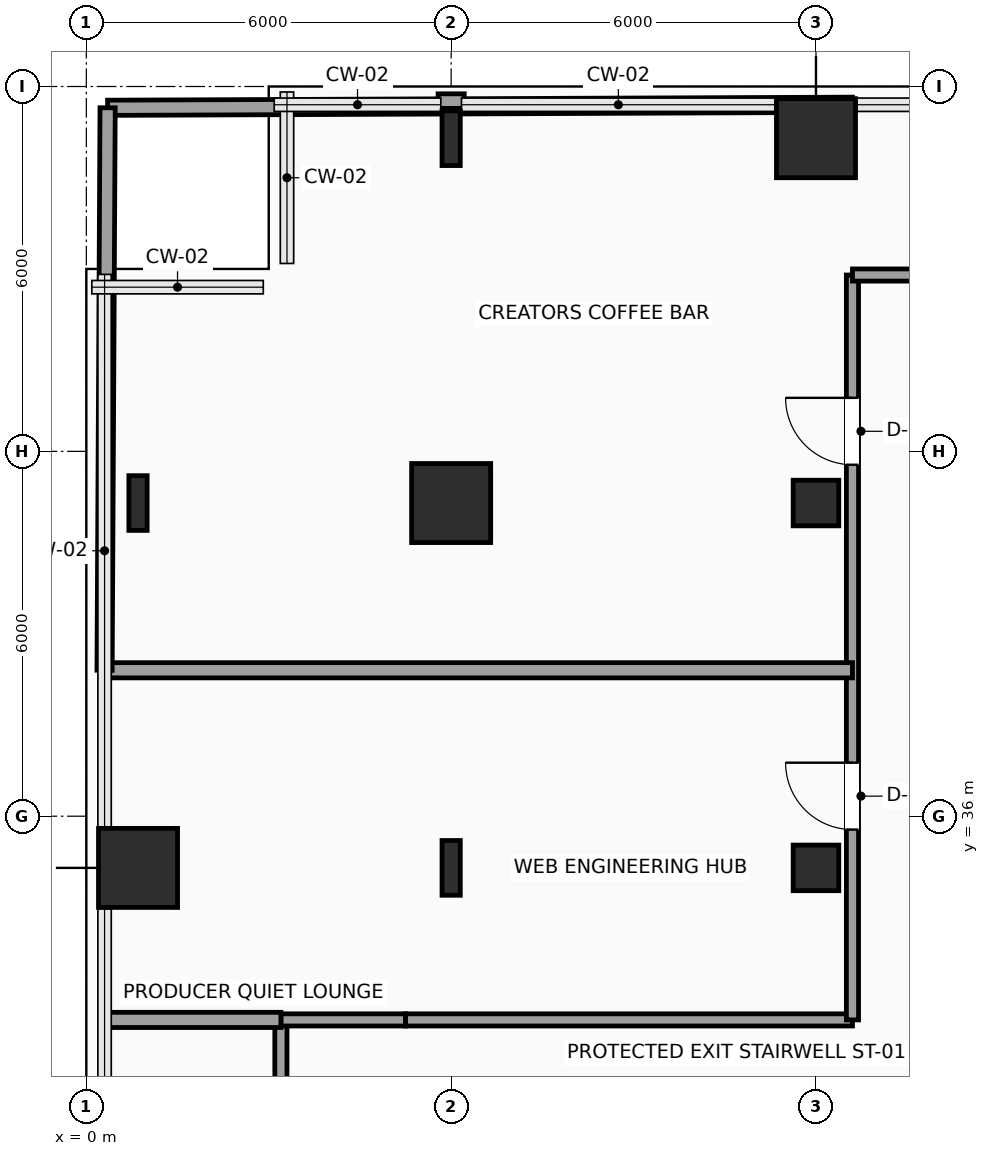
"""IFC4 building model, lengths in metres.
Left out: names, types, materials, properties, quantities, classifications, styles, units other than length and angle.
Written with IfcOpenShell. Run it as: python <this file> out.ifc"""

import sys

from ifc_helpers import new_model, si_unit, direction, frame, frame_2d, origin, origin_2d, place, context, subcontext, project, spatial, rectangle, hollow_rectangle, i_section, extrude, element, fill, save


model = new_model("IFC4")
c1 = context("Model", 3, precision=1e-05, world=origin(), true_north=direction((0.0, 1.0)))
c2 = subcontext(c1, "Body", "Model", "MODEL_VIEW")
j1 = project(units=[si_unit("LENGTHUNIT", "METRE"), si_unit("PLANEANGLEUNIT", "RADIAN")], contexts=[c1])
p1 = place(None, origin())
s1 = spatial("IfcSite", under=j1, at=p1, CompositionType="ELEMENT")
p2 = place(p1, origin())
s2 = spatial("IfcBuilding", under=s1, at=p2, CompositionType="ELEMENT")
p3 = place(p2, frame((0.0, 0.0, 83.1)))
s3 = spatial("IfcBuildingStorey", under=s2, at=p3, CompositionType="ELEMENT", Elevation=83.1)
p4 = place(p3, frame((0.85, 35.15, 0.0), z_axis=(0.0, 0.0, 1.0), x_axis=(1.0, 0.0, 0.0)))
e1 = element("IfcColumn", 1, at=p4, inside=s3, PredefinedType="COLUMN", context=c2, shape_type="SweptSolid", body=[
    extrude(rectangle(XDim=1.3, YDim=1.3, at=origin_2d()), origin(), (0.0, 0.0, 1.0), 3.9),
])
for number, where, z_axis, x_axis in (
    (2, (0.85, 41.15, 0.0), (0.0, 0.0, 1.0), (1.0, 0.0, 0.0)),
    (3, (6.0, 35.15, 0.0), (0.0, 0.0, 1.0), (1.0, 0.0, 0.0)),
):
    element("IfcColumn", number, at=place(p3, frame(where, z_axis=z_axis, x_axis=x_axis)), inside=s3, PredefinedType="COLUMN", context=c2, shape_type="SweptSolid", body=[
        extrude(i_section(OverallWidth=0.3, OverallDepth=0.9, WebThickness=0.019, FlangeThickness=0.035, FilletRadius=0.03, at=origin_2d()), origin(), (0.0, 0.0, 1.0), 3.9),
    ])
p5 = place(p3, frame((6.0, 41.15, 0.0), z_axis=(0.0, 0.0, 1.0), x_axis=(1.0, 0.0, 0.0)))
e4 = element("IfcColumn", 4, at=p5, inside=s3, PredefinedType="COLUMN", context=c2, shape_type="SweptSolid", body=[
    extrude(rectangle(XDim=1.3, YDim=1.3, at=origin_2d()), origin(), (0.0, 0.0, 1.0), 3.9),
])
p6 = place(p3, frame((6.0, 47.15, 0.0), z_axis=(0.0, 0.0, 1.0), x_axis=(1.0, 0.0, 0.0)))
e5 = element("IfcColumn", 5, at=p6, inside=s3, PredefinedType="COLUMN", context=c2, shape_type="SweptSolid", body=[
    extrude(i_section(OverallWidth=0.3, OverallDepth=0.9, WebThickness=0.019, FlangeThickness=0.035, FilletRadius=0.03, at=origin_2d()), origin(), (0.0, 0.0, 1.0), 3.9),
])
for number, where, z_axis, x_axis in (
    (6, (12.0, 35.15, 0.0), (0.0, 0.0, 1.0), (1.0, 0.0, 0.0)),
    (7, (12.0, 41.15, 0.0), (0.0, 0.0, 1.0), (1.0, 0.0, 0.0)),
):
    element("IfcColumn", number, at=place(p3, frame(where, z_axis=z_axis, x_axis=x_axis)), inside=s3, PredefinedType="COLUMN", context=c2, shape_type="SweptSolid", body=[
        extrude(hollow_rectangle(XDim=0.75, YDim=0.75, WallThickness=0.035, InnerFilletRadius=0.035, OuterFilletRadius=0.05, at=origin_2d()), origin(), (0.0, 0.0, 1.0), 3.9),
    ])
p7 = place(p3, frame((12.0, 47.15, 0.0), z_axis=(0.0, 0.0, 1.0), x_axis=(1.0, 0.0, 0.0)))
e8 = element("IfcColumn", 8, at=p7, inside=s3, PredefinedType="COLUMN", context=c2, shape_type="SweptSolid", body=[
    extrude(rectangle(XDim=1.3, YDim=1.3, at=origin_2d()), origin(), (0.0, 0.0, 1.0), 3.9),
])
p8 = place(p3, frame((5.785, 47.76, 0.0), z_axis=(0.0, 0.0, 1.0), x_axis=(1.0, 0.0, 0.0)))
e9 = element("IfcWall", 9, at=p8, inside=s3, PredefinedType="SOLIDWALL", context=c2, shape_type="SweptSolid", body=[
    extrude(rectangle(XDim=0.43, YDim=0.24, at=frame_2d((0.215, 0.0))), origin(), (0.0, 0.0, 1.0), 3.65),
])
p9 = place(p3, frame((3.2, 30.25, 0.0), z_axis=(0.0, 0.0, 1.0), x_axis=(0.0, 1.0, 0.0)))
e10 = element("IfcWall", 10, at=p9, inside=s3, PredefinedType="PARTITIONING", context=c2, shape_type="SweptSolid", body=[
    extrude(rectangle(XDim=2.4, YDim=0.2, at=frame_2d((1.2, 0.0))), origin(), (0.0, 0.0, 1.0), 3.65),
])
p10 = place(p3, frame((3.2, 32.65, 0.0), z_axis=(0.0, 0.0, 1.0), x_axis=(1.0, 0.0, 0.0)))
e11 = element("IfcWall", 11, at=p10, inside=s3, PredefinedType="PARTITIONING", context=c2, shape_type="SweptSolid", body=[
    extrude(rectangle(XDim=2.05, YDim=0.2, at=frame_2d((1.025, 0.0))), origin(), (0.0, 0.0, 1.0), 3.65),
])
p11 = place(p3, frame((5.25, 32.65, 0.0), z_axis=(0.0, 0.0, 1.0), x_axis=(1.0, 0.0, 0.0)))
e12 = element("IfcWall", 12, at=p11, inside=s3, PredefinedType="PARTITIONING", context=c2, shape_type="SweptSolid", body=[
    extrude(rectangle(XDim=7.35, YDim=0.2, at=frame_2d((3.675, 0.0))), origin(), (0.0, 0.0, 1.0), 3.65),
])
p12 = place(p3, frame((12.6, 32.65, 0.0), z_axis=(0.0, 0.0, 1.0), x_axis=(0.0, 1.0, 0.0)))
e13 = element("IfcWall", 13, at=p12, inside=s3, PredefinedType="PARTITIONING", context=c2, shape_type="SweptSolid", body=[
    extrude(rectangle(XDim=12.25, YDim=0.2, at=frame_2d((6.125, 0.0))), origin(), (0.0, 0.0, 1.0), 3.65),
])
p13 = place(p12, frame((3.13, 0.0, 0.0)))
e14 = element("IfcOpeningElement", 14, at=p13, cuts=e13, PredefinedType="OPENING", context=c2, shape_type="SweptSolid", body=[
    extrude(rectangle(XDim=1.1, YDim=2.25, at=frame_2d((0.55, 1.125))), frame((0.0, 0.11, 0.0), z_axis=(0.0, -1.0, 0.0), x_axis=(1.0, 0.0, 0.0)), (0.0, 0.0, 1.0), 0.22),
])
p14 = place(p12, frame((9.13, 0.0, 0.0)))
e15 = element("IfcOpeningElement", 15, at=p14, cuts=e13, PredefinedType="OPENING", context=c2, shape_type="SweptSolid", body=[
    extrude(rectangle(XDim=1.1, YDim=2.25, at=frame_2d((0.55, 1.125))), frame((0.0, 0.11, 0.0), z_axis=(0.0, -1.0, 0.0), x_axis=(1.0, 0.0, 0.0)), (0.0, 0.0, 1.0), 0.22),
])
p15 = place(p3, frame((12.6, 44.9, 0.0), z_axis=(0.0, 0.0, 1.0), x_axis=(1.0, 0.0, 0.0)))
e16 = element("IfcWall", 16, at=p15, inside=s3, PredefinedType="PARTITIONING", context=c2, shape_type="SweptSolid", body=[
    extrude(rectangle(XDim=2.35, YDim=0.2, at=frame_2d((1.175, 0.0))), origin(), (0.0, 0.0, 1.0), 3.65),
])
p16 = place(p3, frame((0.3, 38.4, 0.0), z_axis=(0.0, 0.0, 1.0), x_axis=(1.0, 0.0, 0.0)))
e17 = element("IfcWall", 17, at=p16, inside=s3, PredefinedType="PARTITIONING", context=c2, shape_type="SweptSolid", body=[
    extrude(rectangle(XDim=12.3, YDim=0.25, at=frame_2d((6.15, 0.0))), origin(), (0.0, 0.0, 1.0), 3.142),
])
p17 = place(p3, frame((0.35, 47.65, 0.0), z_axis=(0.0, 0.0, 1.0), x_axis=(0.999991644778, 0.004087832518, 0.0)))
e18 = element("IfcWall", 18, at=p17, inside=s3, PredefinedType="PARTITIONING", context=c2, shape_type="SweptSolid", body=[
    extrude(rectangle(XDim=5.435, YDim=0.25, at=frame_2d((2.717, 0.0))), origin(), (0.0, 0.0, 1.0), 3.65),
])
p18 = place(p3, frame((6.215, 47.674, 0.0), z_axis=(0.0, 0.0, 1.0), x_axis=(0.999991630701, 0.004091274595, 0.0)))
e19 = element("IfcWall", 19, at=p18, inside=s3, PredefinedType="PARTITIONING", context=c2, shape_type="SweptSolid", body=[
    extrude(rectangle(XDim=6.385, YDim=0.25, at=frame_2d((3.192, 0.0))), origin(), (0.0, 0.0, 1.0), 3.65),
])
p19 = place(p3, frame((0.3, 38.4, 0.0), z_axis=(0.0, 0.0, 1.0), x_axis=(0.005410604923, 0.99998536257, 0.0)))
e20 = element("IfcWall", 20, at=p19, inside=s3, PredefinedType="PARTITIONING", context=c2, shape_type="SweptSolid", body=[
    extrude(rectangle(XDim=9.25, YDim=0.25, at=frame_2d((4.625, 0.0))), origin(), (0.0, 0.0, 1.0), 3.65),
])
p20 = place(p3, frame((0.3, 32.65, 0.0), z_axis=(0.0, 0.0, 1.0), x_axis=(1.0, 0.0, 0.0)))
e21 = element("IfcWall", 21, at=p20, inside=s3, PredefinedType="PARTITIONING", context=c2, shape_type="SweptSolid", body=[
    extrude(rectangle(XDim=2.9, YDim=0.25, at=frame_2d((1.45, 0.0))), origin(), (0.0, 0.0, 1.0), 3.65),
])
p21 = place(p13, origin())
e22 = element("IfcDoor", 22, at=p21, inside=s3, OperationType="SINGLE_SWING_RIGHT", PredefinedType="DOOR", context=c2, shape_type="SweptSolid", body=[
    extrude(rectangle(XDim=1.1, YDim=2.25, at=frame_2d((0.55, 1.125))), frame((0.0, 0.025, 0.0), z_axis=(0.0, -1.0, 0.0), x_axis=(1.0, 0.0, 0.0)), (0.0, 0.0, 1.0), 0.05),
])
fill(e14, e22)
p22 = place(p14, origin())
e23 = element("IfcDoor", 23, at=p22, inside=s3, OperationType="SINGLE_SWING_RIGHT", PredefinedType="DOOR", context=c2, shape_type="SweptSolid", body=[
    extrude(rectangle(XDim=1.1, YDim=2.25, at=frame_2d((0.55, 1.125))), frame((0.0, 0.025, 0.0), z_axis=(0.0, -1.0, 0.0), x_axis=(1.0, 0.0, 0.0)), (0.0, 0.0, 1.0), 0.05),
])
fill(e15, e23)
save(model, sys.argv[1])
